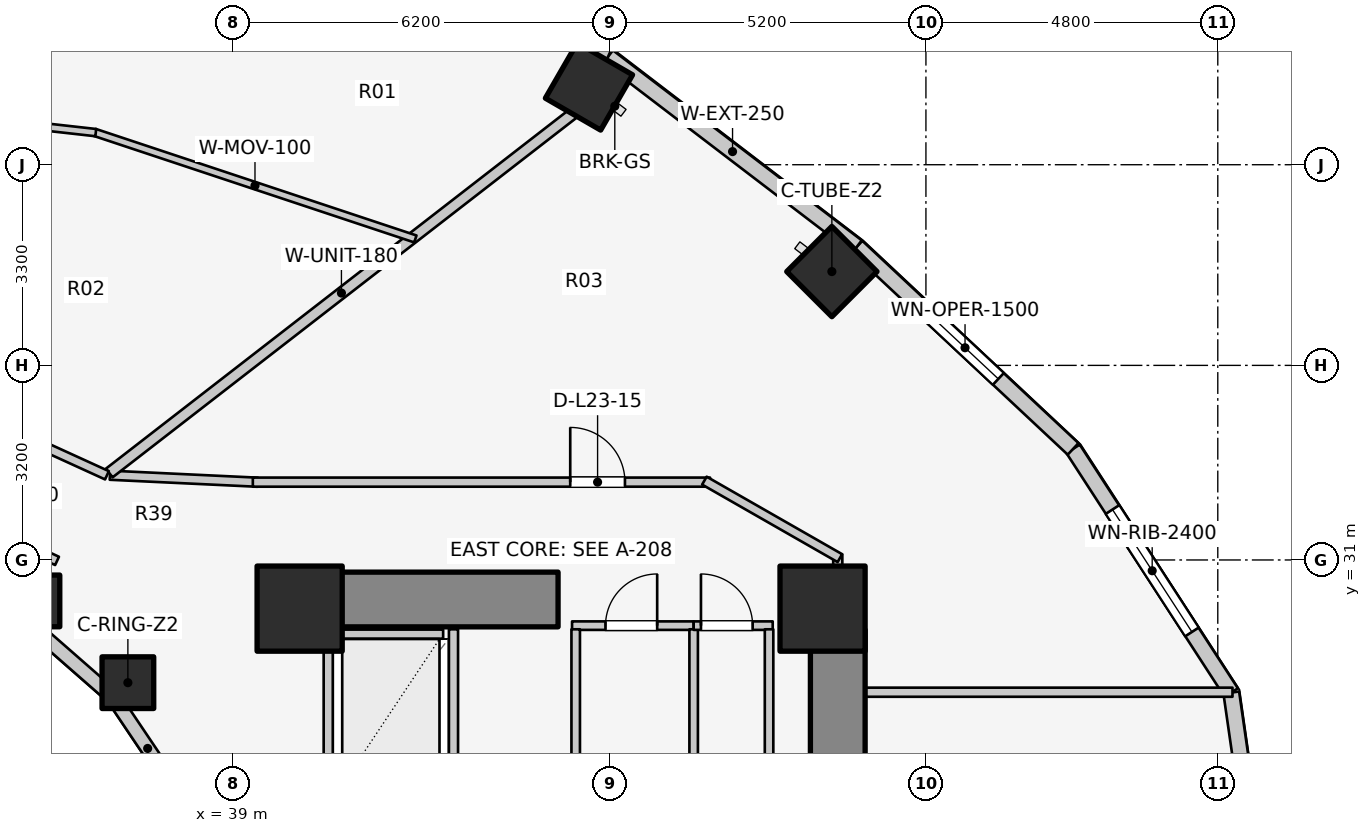
"""IFC4 building model, lengths in metres.
Left out: names, types, materials, properties, quantities, classifications, styles, units other than length and angle.
Written with IfcOpenShell. Run it as: python <this file> out.ifc"""

import sys

from ifc_helpers import new_model, si_unit, direction, frame, frame_2d, origin, origin_2d, place, context, subcontext, project, spatial, rectangle, extrude, element, fill, save


model = new_model("IFC4")
c1 = context("Model", 3, precision=1e-05, world=origin(), true_north=direction((0.0, 1.0)))
c2 = subcontext(c1, "Body", "Model", "MODEL_VIEW")
j1 = project(units=[si_unit("LENGTHUNIT", "METRE"), si_unit("PLANEANGLEUNIT", "RADIAN")], contexts=[c1])
p1 = place(None, origin())
s1 = spatial("IfcSite", under=j1, at=p1, CompositionType="ELEMENT")
p2 = place(p1, origin())
s2 = spatial("IfcBuilding", under=s1, at=p2, CompositionType="ELEMENT")
p3 = place(p2, frame((0.0, 0.0, 79.4)))
s3 = spatial("IfcBuildingStorey", under=s2, at=p3, CompositionType="ELEMENT", Elevation=79.4)
p4 = place(p3, frame((48.95, 17.05, 0.0), z_axis=(0.0, 0.0, 1.0), x_axis=(0.0, 1.0, 0.0)))
e1 = element("IfcWall", 1, at=p4, inside=s3, PredefinedType="SHEAR", context=c2, shape_type="SweptSolid", body=[
    extrude(rectangle(XDim=12.8, YDim=0.9, at=frame_2d((6.4, 0.0))), origin(), (0.0, 0.0, 1.0), 3.1),
])
p5 = place(p3, frame((39.85, 30.35, 0.0), z_axis=(0.0, 0.0, 1.0), x_axis=(1.0, 0.0, 0.0)))
e2 = element("IfcWall", 2, at=p5, inside=s3, PredefinedType="SHEAR", context=c2, shape_type="SweptSolid", body=[
    extrude(rectangle(XDim=4.5, YDim=0.9, at=frame_2d((2.25, 0.0))), origin(), (0.0, 0.0, 1.0), 3.1),
])
for number, where, z_axis, x_axis in (
    (3, (48.7, 30.2, 0.0), (0.0, 0.0, 1.0), (1.0, 0.0, 0.0)),
    (4, (40.1, 30.2, 0.0), (0.0, 0.0, 1.0), (1.0, 0.0, 0.0)),
):
    element("IfcColumn", number, at=place(p3, frame(where, z_axis=z_axis, x_axis=x_axis)), inside=s3, PredefinedType="COLUMN", context=c2, shape_type="SweptSolid", body=[
        extrude(rectangle(XDim=1.4, YDim=1.4, at=origin_2d()), origin(), (0.0, 0.0, 1.0), 3.1),
    ])
p6 = place(p3, frame((37.275, 28.982, 0.0), z_axis=(0.0, 0.0, 1.0), x_axis=(1.0, 0.0, 0.0)))
e5 = element("IfcColumn", 5, at=p6, inside=s3, PredefinedType="COLUMN", context=c2, shape_type="SweptSolid", body=[
    extrude(rectangle(XDim=0.85, YDim=0.85, at=origin_2d()), origin(), (0.0, 0.0, 1.0), 3.1),
])
p7 = place(p3, frame((48.853, 35.743, 0.0), z_axis=(0.0, 0.0, 1.0), x_axis=(0.707106781187, 0.707106781187, 0.0)))
e6 = element("IfcColumn", 6, at=p7, inside=s3, PredefinedType="COLUMN", context=c2, shape_type="SweptSolid", body=[
    extrude(rectangle(XDim=1.05, YDim=1.05, at=origin_2d()), origin(), (0.0, 0.0, 1.0), 3.1),
])
p8 = place(p3, frame((35.73, 30.327, 0.0), z_axis=(0.0, 0.0, 1.0), x_axis=(1.0, 0.0, 0.0)))
e7 = element("IfcColumn", 7, at=p8, inside=s3, PredefinedType="COLUMN", context=c2, shape_type="SweptSolid", body=[
    extrude(rectangle(XDim=0.85, YDim=0.85, at=origin_2d()), origin(), (0.0, 0.0, 1.0), 3.1),
])
p9 = place(p3, frame((44.858, 38.786, 0.0), z_axis=(0.0, 0.0, 1.0), x_axis=(0.5, 0.866025403784, 0.0)))
e8 = element("IfcColumn", 8, at=p9, inside=s3, PredefinedType="COLUMN", context=c2, shape_type="SweptSolid", body=[
    extrude(rectangle(XDim=1.05, YDim=1.05, at=origin_2d()), origin(), (0.0, 0.0, 1.0), 3.1),
])
p10 = place(p3, frame((38.166, 27.06, 0.0), z_axis=(0.0, 0.0, 1.0), x_axis=(-0.558197800898, 0.829707909492, 0.0)))
e9 = element("IfcWall", 9, at=p10, inside=s3, PredefinedType="STANDARD", context=c2, shape_type="SweptSolid", body=[
    extrude(rectangle(XDim=2.027, YDim=0.23, at=frame_2d((1.013, 0.0))), origin(), (0.0, 0.0, 1.0), 2.16),
])
p11 = place(p3, frame((37.035, 28.742, 0.0), z_axis=(0.0, 0.0, 1.0), x_axis=(-0.752576694707, 0.658504607869, 0.0)))
e10 = element("IfcWall", 10, at=p11, inside=s3, PredefinedType="STANDARD", context=c2, shape_type="SweptSolid", body=[
    extrude(rectangle(XDim=1.959, YDim=0.23, at=frame_2d((0.98, 0.0))), origin(), (0.0, 0.0, 1.0), 2.16),
])
p12 = place(p3, frame((56.26, 23.0, 0.0), z_axis=(0.0, 0.0, 1.0), x_axis=(-0.142572472068, 0.98978436551, 0.0)))
e11 = element("IfcWall", 11, at=p12, inside=s3, PredefinedType="STANDARD", context=c2, shape_type="SweptSolid", body=[
    extrude(rectangle(XDim=5.879, YDim=0.26, at=frame_2d((2.939, 0.0))), origin(), (0.0, 0.0, 1.0), 2.85),
])
p13 = place(p12, frame((2.921, 0.0, 0.75)))
e12 = element("IfcOpeningElement", 12, at=p13, cuts=e11, PredefinedType="OPENING", context=c2, shape_type="SweptSolid", body=[
    extrude(rectangle(XDim=1.2, YDim=1.5, at=frame_2d((0.6, 0.75))), frame((0.0, 0.14, 0.0), z_axis=(0.0, -1.0, 0.0), x_axis=(1.0, 0.0, 0.0)), (0.0, 0.0, 1.0), 0.28),
])
p14 = place(p3, frame((55.422, 28.819, 0.0), z_axis=(0.0, 0.0, 1.0), x_axis=(-0.544388392991, 0.838833283541, 0.0)))
e13 = element("IfcWall", 13, at=p14, inside=s3, PredefinedType="STANDARD", context=c2, shape_type="SweptSolid", body=[
    extrude(rectangle(XDim=4.778, YDim=0.26, at=frame_2d((2.389, 0.0))), origin(), (0.0, 0.0, 1.0), 2.85),
])
p15 = place(p14, frame((1.189, 0.0, 0.75)))
e14 = element("IfcOpeningElement", 14, at=p15, cuts=e13, PredefinedType="OPENING", context=c2, shape_type="SweptSolid", body=[
    extrude(rectangle(XDim=2.4, YDim=1.7, at=frame_2d((1.2, 0.85))), frame((0.0, 0.14, 0.0), z_axis=(0.0, -1.0, 0.0), x_axis=(1.0, 0.0, 0.0)), (0.0, 0.0, 1.0), 0.28),
])
p16 = place(p3, frame((52.821, 32.827, 0.0), z_axis=(0.0, 0.0, 1.0), x_axis=(-0.730162452258, 0.68327358599, 0.0)))
e15 = element("IfcWall", 15, at=p16, inside=s3, PredefinedType="STANDARD", context=c2, shape_type="SweptSolid", body=[
    extrude(rectangle(XDim=4.868, YDim=0.26, at=frame_2d((2.434, 0.0))), origin(), (0.0, 0.0, 1.0), 2.85),
])
p17 = place(p16, frame((1.684, 0.0, 0.75)))
e16 = element("IfcOpeningElement", 16, at=p17, cuts=e15, PredefinedType="OPENING", context=c2, shape_type="SweptSolid", body=[
    extrude(rectangle(XDim=1.5, YDim=1.6, at=frame_2d((0.75, 0.8))), frame((0.0, 0.14, 0.0), z_axis=(0.0, -1.0, 0.0), x_axis=(1.0, 0.0, 0.0)), (0.0, 0.0, 1.0), 0.28),
])
p18 = place(p3, frame((49.266, 36.153, 0.0), z_axis=(0.0, 0.0, 1.0), x_axis=(-0.794809810864, 0.606858603427, 0.0)))
e17 = element("IfcWall", 17, at=p18, inside=s3, PredefinedType="STANDARD", context=c2, shape_type="SweptSolid", body=[
    extrude(rectangle(XDim=5.149, YDim=0.26, at=frame_2d((2.575, 0.0))), origin(), (0.0, 0.0, 1.0), 2.85),
])
p19 = place(p3, frame((45.173, 39.278, 0.0), z_axis=(0.0, 0.0, 1.0), x_axis=(-0.914336605747, 0.404955023911, 0.0)))
e18 = element("IfcWall", 18, at=p19, inside=s3, PredefinedType="STANDARD", context=c2, shape_type="SweptSolid", body=[
    extrude(rectangle(XDim=5.859, YDim=0.26, at=frame_2d((2.929, 0.0))), origin(), (0.0, 0.0, 1.0), 2.85),
])
p20 = place(p19, frame((1.729, 0.0, 0.75)))
e19 = element("IfcOpeningElement", 19, at=p20, cuts=e18, PredefinedType="OPENING", context=c2, shape_type="SweptSolid", body=[
    extrude(rectangle(XDim=2.4, YDim=1.7, at=frame_2d((1.2, 0.85))), frame((0.0, 0.14, 0.0), z_axis=(0.0, -1.0, 0.0), x_axis=(1.0, 0.0, 0.0)), (0.0, 0.0, 1.0), 0.28),
])
p21 = place(p3, frame((40.74, 29.78, 0.0), z_axis=(0.0, 0.0, 1.0), x_axis=(1.0, 0.0, 0.0)))
e20 = element("IfcWall", 20, at=p21, inside=s3, PredefinedType="SOLIDWALL", context=c2, shape_type="SweptSolid", body=[
    extrude(rectangle(XDim=1.72, YDim=0.15, at=frame_2d((0.86, 0.0))), origin(), (0.0, 0.0, 1.0), 2.855),
])
for number, where, z_axis, x_axis in (
    (21, (40.57, 27.14, 0.0), (0.0, 0.0, 1.0), (0.0, 1.0, 0.0)),
    (22, (42.63, 27.14, 0.0), (0.0, 0.0, 1.0), (0.0, 1.0, 0.0)),
):
    element("IfcWall", number, at=place(p3, frame(where, z_axis=z_axis, x_axis=x_axis)), inside=s3, PredefinedType="SOLIDWALL", context=c2, shape_type="SweptSolid", body=[
        extrude(rectangle(XDim=2.72, YDim=0.15, at=frame_2d((1.36, 0.0))), origin(), (0.0, 0.0, 1.0), 2.855),
    ])
p22 = place(p3, frame((44.58, 29.92, 0.0), z_axis=(0.0, 0.0, 1.0), x_axis=(1.0, 0.0, 0.0)))
e23 = element("IfcWall", 23, at=p22, inside=s3, PredefinedType="PLUMBINGWALL", context=c2, shape_type="SweptSolid", body=[
    extrude(rectangle(XDim=2.0, YDim=0.14, at=frame_2d((1.0, 0.0))), origin(), (0.0, 0.0, 1.0), 2.855),
])
p23 = place(p22, frame((0.55, 0.0, 0.0)))
e24 = element("IfcOpeningElement", 24, at=p23, cuts=e23, PredefinedType="OPENING", context=c2, shape_type="SweptSolid", body=[
    extrude(rectangle(XDim=0.85, YDim=2.05, at=frame_2d((0.425, 1.025))), frame((0.0, 0.08, 0.0), z_axis=(0.0, -1.0, 0.0), x_axis=(1.0, 0.0, 0.0)), (0.0, 0.0, 1.0), 0.16),
])
for number, where, z_axis, x_axis in (
    (25, (44.64, 25.98, 0.0), (0.0, 0.0, 1.0), (0.0, 1.0, 0.0)),
    (26, (46.58, 25.98, 0.0), (0.0, 0.0, 1.0), (0.0, 1.0, 0.0)),
):
    element("IfcWall", number, at=place(p3, frame(where, z_axis=z_axis, x_axis=x_axis)), inside=s3, PredefinedType="PLUMBINGWALL", context=c2, shape_type="SweptSolid", body=[
        extrude(rectangle(XDim=3.88, YDim=0.14, at=frame_2d((1.94, 0.0))), origin(), (0.0, 0.0, 1.0), 2.855),
    ])
p24 = place(p3, frame((46.58, 29.92, 0.0), z_axis=(0.0, 0.0, 1.0), x_axis=(1.0, 0.0, 0.0)))
e27 = element("IfcWall", 27, at=p24, inside=s3, PredefinedType="PLUMBINGWALL", context=c2, shape_type="SweptSolid", body=[
    extrude(rectangle(XDim=1.3, YDim=0.14, at=frame_2d((0.65, 0.0))), origin(), (0.0, 0.0, 1.0), 2.855),
])
p25 = place(p24, frame((0.12, 0.0, 0.0)))
e28 = element("IfcOpeningElement", 28, at=p25, cuts=e27, PredefinedType="OPENING", context=c2, shape_type="SweptSolid", body=[
    extrude(rectangle(XDim=0.85, YDim=2.05, at=frame_2d((0.425, 1.025))), frame((0.0, 0.08, 0.0), z_axis=(0.0, -1.0, 0.0), x_axis=(1.0, 0.0, 0.0)), (0.0, 0.0, 1.0), 0.16),
])
p26 = place(p3, frame((47.82, 25.98, 0.0), z_axis=(0.0, 0.0, 1.0), x_axis=(0.0, 1.0, 0.0)))
e29 = element("IfcWall", 29, at=p26, inside=s3, PredefinedType="PLUMBINGWALL", context=c2, shape_type="SweptSolid", body=[
    extrude(rectangle(XDim=3.88, YDim=0.14, at=frame_2d((1.94, 0.0))), origin(), (0.0, 0.0, 1.0), 2.855),
])
p27 = place(p3, frame((36.11, 30.985, 0.0), z_axis=(0.0, 0.0, 1.0), x_axis=(-0.906943449489, 0.421252393975, 0.0)))
e30 = element("IfcWall", 30, at=p27, inside=s3, PredefinedType="PARTITIONING", context=c2, shape_type="SweptSolid", body=[
    extrude(rectangle(XDim=2.186, YDim=0.15, at=frame_2d((1.093, 0.0))), origin(), (0.0, 0.0, 1.0), 2.272),
])
p28 = place(p3, frame((48.95, 28.825, 0.0), z_axis=(0.0, 0.0, 1.0), x_axis=(1.0, 0.0, 0.0)))
e31 = element("IfcWall", 31, at=p28, inside=s3, PredefinedType="PARTITIONING", context=c2, shape_type="SweptSolid", body=[
    extrude(rectangle(XDim=6.492, YDim=0.15, at=frame_2d((3.246, 0.0))), origin(), (0.0, 0.0, 1.0), 2.855),
])
p29 = place(p3, frame((48.95, 29.8, 0.0), z_axis=(0.0, 0.0, 1.0), x_axis=(0.0, 1.0, 0.0)))
e32 = element("IfcWall", 32, at=p29, inside=s3, PredefinedType="PARTITIONING", context=c2, shape_type="SweptSolid", body=[
    extrude(rectangle(XDim=1.29, YDim=0.15, at=frame_2d((0.645, 0.0))), origin(), (0.0, 0.0, 1.0), 2.142),
])
p30 = place(p3, frame((36.98, 32.394, 0.0), z_axis=(0.0, 0.0, 1.0), x_axis=(0.998877427952, -0.047369651964, 0.0)))
e33 = element("IfcWall", 33, at=p30, inside=s3, PredefinedType="PARTITIONING", context=c2, shape_type="SweptSolid", body=[
    extrude(rectangle(XDim=2.433, YDim=0.15, at=frame_2d((1.216, 0.0))), origin(), (0.0, 0.0, 1.0), 2.272),
])
p31 = place(p3, frame((39.33, 32.28, 0.0), z_axis=(0.0, 0.0, 1.0), x_axis=(1.0, 0.0, 0.0)))
e34 = element("IfcWall", 34, at=p31, inside=s3, PredefinedType="PARTITIONING", context=c2, shape_type="SweptSolid", body=[
    extrude(rectangle(XDim=7.52, YDim=0.15, at=frame_2d((3.76, 0.0))), origin(), (0.0, 0.0, 1.0), 2.272),
])
p32 = place(p31, frame((5.22, 0.0, 0.0)))
e35 = element("IfcOpeningElement", 35, at=p32, cuts=e34, PredefinedType="OPENING", context=c2, shape_type="SweptSolid", body=[
    extrude(rectangle(XDim=0.9, YDim=2.1, at=frame_2d((0.45, 1.05))), frame((0.0, 0.085, 0.0), z_axis=(0.0, -1.0, 0.0), x_axis=(1.0, 0.0, 0.0)), (0.0, 0.0, 1.0), 0.17),
])
p33 = place(p3, frame((46.757, 32.305, 0.0), z_axis=(0.0, 0.0, 1.0), x_axis=(0.867991349648, -0.496579315857, 0.0)))
e36 = element("IfcWall", 36, at=p33, inside=s3, PredefinedType="PARTITIONING", context=c2, shape_type="SweptSolid", body=[
    extrude(rectangle(XDim=2.567, YDim=0.15, at=frame_2d((1.283, 0.0))), origin(), (0.0, 0.0, 1.0), 2.142),
])
p34 = place(p3, frame((36.969, 32.43, 0.0), z_axis=(0.0, 0.0, 1.0), x_axis=(0.790421780952, 0.612562983045, 0.0)))
e37 = element("IfcWall", 37, at=p34, inside=s3, PredefinedType="PARTITIONING", context=c2, shape_type="SweptSolid", body=[
    extrude(rectangle(XDim=9.662, YDim=0.18, at=frame_2d((4.831, 0.0))), origin(), (0.0, 0.0, 1.0), 2.272),
])
p35 = place(p3, frame((42.003, 36.279, 0.0), z_axis=(0.0, 0.0, 1.0), x_axis=(-0.948981517829, 0.315331696502, 0.0)))
e38 = element("IfcWall", 38, at=p35, inside=s3, PredefinedType="MOVABLE", context=c2, shape_type="SweptSolid", body=[
    extrude(rectangle(XDim=5.559, YDim=0.12, at=frame_2d((2.78, 0.0))), origin(), (0.0, 0.0, 1.0), 2.272),
])
p36 = place(p3, frame((36.747, 38.028, 0.0), z_axis=(0.0, 0.0, 1.0), x_axis=(-0.9937938415, 0.111237586262, 0.0)))
e39 = element("IfcWall", 39, at=p36, inside=s3, PredefinedType="MOVABLE", context=c2, shape_type="SweptSolid", body=[
    extrude(rectangle(XDim=4.787, YDim=0.12, at=frame_2d((2.394, 0.0))), origin(), (0.0, 0.0, 1.0), 2.272),
])
p37 = place(p3, frame((36.931, 32.393, 0.0), z_axis=(0.0, 0.0, 1.0), x_axis=(-0.909747571199, 0.415161843982, 0.0)))
e40 = element("IfcWall", 40, at=p37, inside=s3, PredefinedType="PARTITIONING", context=c2, shape_type="SweptSolid", body=[
    extrude(rectangle(XDim=2.625, YDim=0.15, at=frame_2d((1.312, 0.0))), origin(), (0.0, 0.0, 1.0), 2.272),
])
p38 = place(p15, origin())
e41 = element("IfcWindow", 41, at=p38, inside=s3, PartitioningType="SINGLE_PANEL", PredefinedType="WINDOW", context=c2, shape_type="SweptSolid", body=[
    extrude(rectangle(XDim=2.4, YDim=1.7, at=frame_2d((1.2, 0.85))), frame((0.0, 0.03, 0.0), z_axis=(0.0, -1.0, 0.0), x_axis=(1.0, 0.0, 0.0)), (0.0, 0.0, 1.0), 0.06),
])
fill(e14, e41)
p39 = place(p17, origin())
e42 = element("IfcWindow", 42, at=p39, inside=s3, PartitioningType="SINGLE_PANEL", PredefinedType="WINDOW", context=c2, shape_type="SweptSolid", body=[
    extrude(rectangle(XDim=1.5, YDim=1.6, at=frame_2d((0.75, 0.8))), frame((0.0, 0.03, 0.0), z_axis=(0.0, -1.0, 0.0), x_axis=(1.0, 0.0, 0.0)), (0.0, 0.0, 1.0), 0.06),
])
fill(e16, e42)
p40 = place(p23, origin())
e43 = element("IfcDoor", 43, at=p40, inside=s3, OperationType="SINGLE_SWING_RIGHT", PredefinedType="DOOR", context=c2, shape_type="SweptSolid", body=[
    extrude(rectangle(XDim=0.85, YDim=2.05, at=frame_2d((0.425, 1.025))), frame((0.0, 0.025, 0.0), z_axis=(0.0, -1.0, 0.0), x_axis=(1.0, 0.0, 0.0)), (0.0, 0.0, 1.0), 0.05),
])
fill(e24, e43)
p41 = place(p25, origin())
e44 = element("IfcDoor", 44, at=p41, inside=s3, OperationType="SINGLE_SWING_LEFT", PredefinedType="DOOR", context=c2, shape_type="SweptSolid", body=[
    extrude(rectangle(XDim=0.85, YDim=2.05, at=frame_2d((0.425, 1.025))), frame((0.0, 0.025, 0.0), z_axis=(0.0, -1.0, 0.0), x_axis=(1.0, 0.0, 0.0)), (0.0, 0.0, 1.0), 0.05),
])
fill(e28, e44)
p42 = place(p32, origin())
e45 = element("IfcDoor", 45, at=p42, inside=s3, OperationType="SINGLE_SWING_LEFT", PredefinedType="DOOR", context=c2, shape_type="SweptSolid", body=[
    extrude(rectangle(XDim=0.9, YDim=2.1, at=frame_2d((0.45, 1.05))), frame((0.0, 0.025, 0.0), z_axis=(0.0, -1.0, 0.0), x_axis=(1.0, 0.0, 0.0)), (0.0, 0.0, 1.0), 0.05),
])
fill(e35, e45)
save(model, sys.argv[1])
